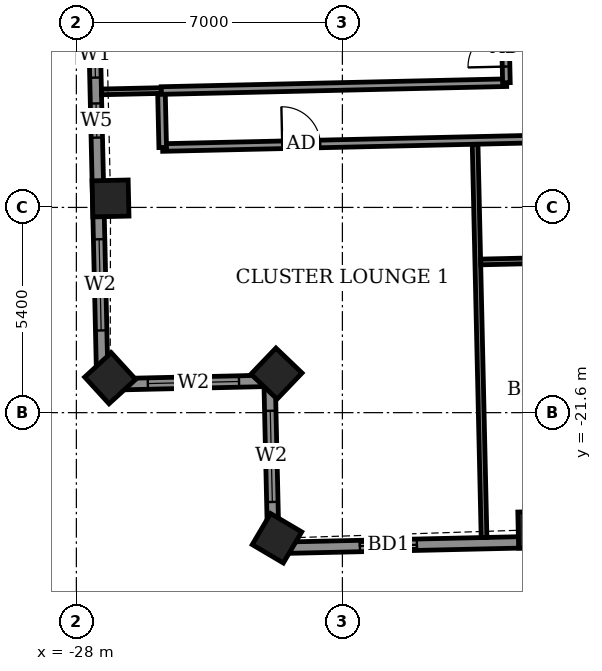
"""IFC4 building model, lengths in metres.
Left out: names, types, materials, properties, quantities, classifications, styles, units other than length and angle.
Written with IfcOpenShell. Run it as: python <this file> out.ifc"""

import sys

from ifc_helpers import new_model, si_unit, direction, frame, frame_2d, origin, origin_2d, place, context, subcontext, project, spatial, rectangle, extrude, element, fill, save


model = new_model("IFC4")
c1 = context("Model", 3, precision=1e-05, world=origin(), true_north=direction((0.0, 1.0)))
c2 = subcontext(c1, "Body", "Model", "MODEL_VIEW")
j1 = project(units=[si_unit("LENGTHUNIT", "METRE"), si_unit("PLANEANGLEUNIT", "RADIAN")], contexts=[c1])
p1 = place(None, origin())
s1 = spatial("IfcSite", under=j1, at=p1, CompositionType="ELEMENT")
p2 = place(p1, origin())
s2 = spatial("IfcBuilding", under=s1, at=p2, CompositionType="ELEMENT")
p3 = place(p2, frame((0.0, 0.0, 279.9)))
s3 = spatial("IfcBuildingStorey", under=s2, at=p3, CompositionType="ELEMENT", Elevation=279.9)
for number, where, z_axis, x_axis in (
    (1, (-27.101, -15.964, -0.55), (0.0, 0.0, 1.0), (0.023, -1.0, 0.0)),
    (2, (-27.11, -20.695, -0.55), (0.0, 0.0, 1.0), (0.675, -0.738, 0.0)),
    (3, (-22.734, -20.572, -0.55), (0.0, 0.0, 1.0), (0.723, -0.691, 0.0)),
    (4, (-22.721, -24.905, -0.55), (0.0, 0.0, 1.0), (0.861, -0.509, 0.0)),
    (5, (-15.899, -24.679, -0.55), (0.0, 0.0, 1.0), (1.0, 0.023, 0.0)),
):
    element("IfcColumn", number, at=place(p3, frame(where, z_axis=z_axis, x_axis=x_axis)), inside=s3, PredefinedType="COLUMN", context=c2, shape_type="SweptSolid", body=[
        extrude(rectangle(XDim=0.95, YDim=0.95, at=origin_2d()), origin(), (0.0, 0.0, 1.0), 3.6),
    ])
p4 = place(p3, frame((-27.665, -5.416, 0.0), z_axis=(0.0, 0.0, 1.0), x_axis=(0.022660024814, -0.999743228672, 0.0)))
e6 = element("IfcWall", 6, at=p4, inside=s3, PredefinedType="SOLIDWALL", context=c2, shape_type="SweptSolid", body=[
    extrude(rectangle(XDim=15.45, YDim=0.3, at=frame_2d((7.725, 0.0))), origin(), (0.0, 0.0, 1.0), 2.55),
])
p5 = place(p4, frame((1.35, 0.0, 0.0)))
e7 = element("IfcOpeningElement", 7, at=p5, cuts=e6, PredefinedType="OPENING", context=c2, shape_type="SweptSolid", body=[
    extrude(rectangle(XDim=1.5, YDim=2.4, at=frame_2d((0.75, 1.2))), frame((0.0, 0.16, 0.0), z_axis=(0.0, -1.0, 0.0), x_axis=(1.0, 0.0, 0.0)), (0.0, 0.0, 1.0), 0.32),
])
p6 = place(p4, frame((6.171, 0.0, 0.9)))
e8 = element("IfcOpeningElement", 8, at=p6, cuts=e6, PredefinedType="OPENING", context=c2, shape_type="SweptSolid", body=[
    extrude(rectangle(XDim=1.2, YDim=1.5, at=frame_2d((0.6, 0.75))), frame((0.0, 0.16, 0.0), z_axis=(0.0, -1.0, 0.0), x_axis=(1.0, 0.0, 0.0)), (0.0, 0.0, 1.0), 0.32),
])
p7 = place(p4, frame((8.05, 0.0, 0.9)))
e9 = element("IfcOpeningElement", 9, at=p7, cuts=e6, PredefinedType="OPENING", context=c2, shape_type="SweptSolid", body=[
    extrude(rectangle(XDim=0.9, YDim=1.5, at=frame_2d((0.45, 0.75))), frame((0.0, 0.16, 0.0), z_axis=(0.0, -1.0, 0.0), x_axis=(1.0, 0.0, 0.0)), (0.0, 0.0, 1.0), 0.32),
])
p8 = place(p4, frame((11.625, 0.0, 0.9)))
e10 = element("IfcOpeningElement", 10, at=p8, cuts=e6, PredefinedType="OPENING", context=c2, shape_type="SweptSolid", body=[
    extrude(rectangle(XDim=2.4, YDim=1.5, at=frame_2d((1.2, 0.75))), frame((0.0, 0.16, 0.0), z_axis=(0.0, -1.0, 0.0), x_axis=(1.0, 0.0, 0.0)), (0.0, 0.0, 1.0), 0.32),
])
p9 = place(p3, frame((-27.315, -20.862, 0.0), z_axis=(0.0, 0.0, 1.0), x_axis=(0.999741204967, 0.022749133868, 0.0)))
e11 = element("IfcWall", 11, at=p9, inside=s3, PredefinedType="SOLIDWALL", context=c2, shape_type="SweptSolid", body=[
    extrude(rectangle(XDim=4.4, YDim=0.3, at=frame_2d((2.2, 0.0))), origin(), (0.0, 0.0, 1.0), 2.55),
])
p10 = place(p9, frame((1.196, 0.0, 0.9)))
e12 = element("IfcOpeningElement", 12, at=p10, cuts=e11, PredefinedType="OPENING", context=c2, shape_type="SweptSolid", body=[
    extrude(rectangle(XDim=2.4, YDim=1.5, at=frame_2d((1.2, 0.75))), frame((0.0, 0.16, 0.0), z_axis=(0.0, -1.0, 0.0), x_axis=(1.0, 0.0, 0.0)), (0.0, 0.0, 1.0), 0.32),
])
p11 = place(p3, frame((-22.916, -20.762, 0.0), z_axis=(0.0, 0.0, 1.0), x_axis=(0.022749133868, -0.999741204967, 0.0)))
e13 = element("IfcWall", 13, at=p11, inside=s3, PredefinedType="SOLIDWALL", context=c2, shape_type="SweptSolid", body=[
    extrude(rectangle(XDim=4.4, YDim=0.3, at=frame_2d((2.2, 0.0))), origin(), (0.0, 0.0, 1.0), 2.55),
])
p12 = place(p11, frame((0.789, 0.0, 0.9)))
e14 = element("IfcOpeningElement", 14, at=p12, cuts=e13, PredefinedType="OPENING", context=c2, shape_type="SweptSolid", body=[
    extrude(rectangle(XDim=2.4, YDim=1.5, at=frame_2d((1.2, 0.75))), frame((0.0, 0.16, 0.0), z_axis=(0.0, -1.0, 0.0), x_axis=(1.0, 0.0, 0.0)), (0.0, 0.0, 1.0), 0.32),
])
p13 = place(p3, frame((-22.816, -25.161, 0.0), z_axis=(0.0, 0.0, 1.0), x_axis=(0.999742646411, 0.022685699159, 0.0)))
e15 = element("IfcWall", 15, at=p13, inside=s3, PredefinedType="SOLIDWALL", context=c2, shape_type="SweptSolid", body=[
    extrude(rectangle(XDim=49.236, YDim=0.3, at=frame_2d((24.618, 0.0))), origin(), (0.0, 0.0, 1.0), 2.5),
])
p14 = place(p13, frame((2.277, 0.0, 0.0)))
e16 = element("IfcOpeningElement", 16, at=p14, cuts=e15, PredefinedType="OPENING", context=c2, shape_type="SweptSolid", body=[
    extrude(rectangle(XDim=1.5, YDim=2.4, at=frame_2d((0.75, 1.2))), frame((0.0, 0.16, 0.0), z_axis=(0.0, -1.0, 0.0), x_axis=(1.0, 0.0, 0.0)), (0.0, 0.0, 1.0), 0.32),
])
p15 = place(p13, frame((7.726, 0.0, 0.0)))
e17 = element("IfcOpeningElement", 17, at=p15, cuts=e15, PredefinedType="OPENING", context=c2, shape_type="SweptSolid", body=[
    extrude(rectangle(XDim=1.5, YDim=2.4, at=frame_2d((0.75, 1.2))), frame((0.0, 0.16, 0.0), z_axis=(0.0, -1.0, 0.0), x_axis=(1.0, 0.0, 0.0)), (0.0, 0.0, 1.0), 0.32),
])
p16 = place(p13, frame((11.039, 0.0, 0.0)))
e18 = element("IfcOpeningElement", 18, at=p16, cuts=e15, PredefinedType="OPENING", context=c2, shape_type="SweptSolid", body=[
    extrude(rectangle(XDim=1.5, YDim=2.4, at=frame_2d((0.75, 1.2))), frame((0.0, 0.16, 0.0), z_axis=(0.0, -1.0, 0.0), x_axis=(1.0, 0.0, 0.0)), (0.0, 0.0, 1.0), 0.32),
])
p17 = place(p13, frame((15.589, 0.0, 0.0)))
e19 = element("IfcOpeningElement", 19, at=p17, cuts=e15, PredefinedType="OPENING", context=c2, shape_type="SweptSolid", body=[
    extrude(rectangle(XDim=1.5, YDim=2.4, at=frame_2d((0.75, 1.2))), frame((0.0, 0.16, 0.0), z_axis=(0.0, -1.0, 0.0), x_axis=(1.0, 0.0, 0.0)), (0.0, 0.0, 1.0), 0.32),
])
p18 = place(p13, frame((18.903, 0.0, 0.0)))
e20 = element("IfcOpeningElement", 20, at=p18, cuts=e15, PredefinedType="OPENING", context=c2, shape_type="SweptSolid", body=[
    extrude(rectangle(XDim=1.5, YDim=2.4, at=frame_2d((0.75, 1.2))), frame((0.0, 0.16, 0.0), z_axis=(0.0, -1.0, 0.0), x_axis=(1.0, 0.0, 0.0)), (0.0, 0.0, 1.0), 0.32),
])
p19 = place(p13, frame((24.3, 0.0, 0.0)))
e21 = element("IfcOpeningElement", 21, at=p19, cuts=e15, PredefinedType="OPENING", context=c2, shape_type="SweptSolid", body=[
    extrude(rectangle(XDim=1.5, YDim=2.4, at=frame_2d((0.75, 1.2))), frame((0.0, 0.16, 0.0), z_axis=(0.0, -1.0, 0.0), x_axis=(1.0, 0.0, 0.0)), (0.0, 0.0, 1.0), 0.32),
])
p20 = place(p13, frame((29.265, 0.0, 0.0)))
e22 = element("IfcOpeningElement", 22, at=p20, cuts=e15, PredefinedType="OPENING", context=c2, shape_type="SweptSolid", body=[
    extrude(rectangle(XDim=1.5, YDim=2.4, at=frame_2d((0.75, 1.2))), frame((0.0, 0.16, 0.0), z_axis=(0.0, -1.0, 0.0), x_axis=(1.0, 0.0, 0.0)), (0.0, 0.0, 1.0), 0.32),
])
p21 = place(p13, frame((32.579, 0.0, 0.0)))
e23 = element("IfcOpeningElement", 23, at=p21, cuts=e15, PredefinedType="OPENING", context=c2, shape_type="SweptSolid", body=[
    extrude(rectangle(XDim=1.5, YDim=2.4, at=frame_2d((0.75, 1.2))), frame((0.0, 0.16, 0.0), z_axis=(0.0, -1.0, 0.0), x_axis=(1.0, 0.0, 0.0)), (0.0, 0.0, 1.0), 0.32),
])
p22 = place(p13, frame((37.4, 0.0, 0.0)))
e24 = element("IfcOpeningElement", 24, at=p22, cuts=e15, PredefinedType="OPENING", context=c2, shape_type="SweptSolid", body=[
    extrude(rectangle(XDim=1.5, YDim=2.4, at=frame_2d((0.75, 1.2))), frame((0.0, 0.16, 0.0), z_axis=(0.0, -1.0, 0.0), x_axis=(1.0, 0.0, 0.0)), (0.0, 0.0, 1.0), 0.32),
])
p23 = place(p13, frame((42.967, 0.0, 0.0)))
e25 = element("IfcOpeningElement", 25, at=p23, cuts=e15, PredefinedType="OPENING", context=c2, shape_type="SweptSolid", body=[
    extrude(rectangle(XDim=1.2, YDim=2.4, at=frame_2d((0.6, 1.2))), frame((0.0, 0.16, 0.0), z_axis=(0.0, -1.0, 0.0), x_axis=(1.0, 0.0, 0.0)), (0.0, 0.0, 1.0), 0.32),
])
p24 = place(p13, frame((45.421, 0.0, 0.9)))
e26 = element("IfcOpeningElement", 26, at=p24, cuts=e15, PredefinedType="OPENING", context=c2, shape_type="SweptSolid", body=[
    extrude(rectangle(XDim=2.4, YDim=1.5, at=frame_2d((1.2, 0.75))), frame((0.0, 0.16, 0.0), z_axis=(0.0, -1.0, 0.0), x_axis=(1.0, 0.0, 0.0)), (0.0, 0.0, 1.0), 0.32),
])
p25 = place(p3, frame((-17.273, -24.885, 0.0), z_axis=(0.0, 0.0, 1.0), x_axis=(-0.022716582742, 0.999741945138, 0.0)))
e27 = element("IfcWall", 27, at=p25, inside=s3, PredefinedType="PARTITIONING", context=c2, shape_type="SweptSolid", body=[
    extrude(rectangle(XDim=10.35, YDim=0.15, at=frame_2d((5.175, 0.0))), origin(), (0.0, 0.0, 1.0), 2.55),
])
p26 = place(p3, frame((-17.36, -17.635, 0.0), z_axis=(0.0, 0.0, 1.0), x_axis=(0.99974031529, 0.022788198363, 0.0)))
e28 = element("IfcWall", 28, at=p26, inside=s3, PredefinedType="PARTITIONING", context=c2, shape_type="SweptSolid", body=[
    extrude(rectangle(XDim=2.325, YDim=0.15, at=frame_2d((1.162, 0.0))), origin(), (0.0, 0.0, 1.0), 3.05),
])
p27 = place(p3, frame((-25.731, -14.624, 0.0), z_axis=(0.0, 0.0, 1.0), x_axis=(0.999742799525, 0.022678950563, 0.0)))
e29 = element("IfcWall", 29, at=p27, inside=s3, PredefinedType="PARTITIONING", context=c2, shape_type="SweptSolid", body=[
    extrude(rectangle(XDim=55.386, YDim=0.2, at=frame_2d((27.693, 0.0))), origin(), (0.0, 0.0, 1.0), 3.05),
])
p28 = place(p27, frame((3.149, 0.0, 0.0)))
e30 = element("IfcOpeningElement", 30, at=p28, cuts=e29, PredefinedType="OPENING", context=c2, shape_type="SweptSolid", body=[
    extrude(rectangle(XDim=1.0, YDim=2.1, at=frame_2d((0.5, 1.05))), frame((0.0, 0.11, 0.0), z_axis=(0.0, -1.0, 0.0), x_axis=(1.0, 0.0, 0.0)), (0.0, 0.0, 1.0), 0.22),
])
p29 = place(p27, frame((11.1, 0.0, 0.0)))
e31 = element("IfcOpeningElement", 31, at=p29, cuts=e29, PredefinedType="OPENING", context=c2, shape_type="SweptSolid", body=[
    extrude(rectangle(XDim=0.9, YDim=2.1, at=frame_2d((0.45, 1.05))), frame((0.0, 0.11, 0.0), z_axis=(0.0, -1.0, 0.0), x_axis=(1.0, 0.0, 0.0)), (0.0, 0.0, 1.0), 0.22),
])
p30 = place(p27, frame((12.95, 0.0, 0.0)))
e32 = element("IfcOpeningElement", 32, at=p30, cuts=e29, PredefinedType="OPENING", context=c2, shape_type="SweptSolid", body=[
    extrude(rectangle(XDim=0.9, YDim=2.1, at=frame_2d((0.45, 1.05))), frame((0.0, 0.11, 0.0), z_axis=(0.0, -1.0, 0.0), x_axis=(1.0, 0.0, 0.0)), (0.0, 0.0, 1.0), 0.22),
])
p31 = place(p27, frame((19.675, 0.0, 0.0)))
e33 = element("IfcOpeningElement", 33, at=p31, cuts=e29, PredefinedType="OPENING", context=c2, shape_type="SweptSolid", body=[
    extrude(rectangle(XDim=0.9, YDim=2.1, at=frame_2d((0.45, 1.05))), frame((0.0, 0.11, 0.0), z_axis=(0.0, -1.0, 0.0), x_axis=(1.0, 0.0, 0.0)), (0.0, 0.0, 1.0), 0.22),
])
p32 = place(p27, frame((21.7, 0.0, 0.0)))
e34 = element("IfcOpeningElement", 34, at=p32, cuts=e29, PredefinedType="OPENING", context=c2, shape_type="SweptSolid", body=[
    extrude(rectangle(XDim=0.9, YDim=2.1, at=frame_2d((0.45, 1.05))), frame((0.0, 0.11, 0.0), z_axis=(0.0, -1.0, 0.0), x_axis=(1.0, 0.0, 0.0)), (0.0, 0.0, 1.0), 0.22),
])
p33 = place(p27, frame((28.475, 0.0, 0.0)))
e35 = element("IfcOpeningElement", 35, at=p33, cuts=e29, PredefinedType="OPENING", context=c2, shape_type="SweptSolid", body=[
    extrude(rectangle(XDim=0.9, YDim=2.1, at=frame_2d((0.45, 1.05))), frame((0.0, 0.11, 0.0), z_axis=(0.0, -1.0, 0.0), x_axis=(1.0, 0.0, 0.0)), (0.0, 0.0, 1.0), 0.22),
])
p34 = place(p27, frame((30.45, 0.0, 0.0)))
e36 = element("IfcOpeningElement", 36, at=p34, cuts=e29, PredefinedType="OPENING", context=c2, shape_type="SweptSolid", body=[
    extrude(rectangle(XDim=0.9, YDim=2.1, at=frame_2d((0.45, 1.05))), frame((0.0, 0.11, 0.0), z_axis=(0.0, -1.0, 0.0), x_axis=(1.0, 0.0, 0.0)), (0.0, 0.0, 1.0), 0.22),
])
p35 = place(p27, frame((37.25, 0.0, 0.0)))
e37 = element("IfcOpeningElement", 37, at=p35, cuts=e29, PredefinedType="OPENING", context=c2, shape_type="SweptSolid", body=[
    extrude(rectangle(XDim=0.9, YDim=2.1, at=frame_2d((0.45, 1.05))), frame((0.0, 0.11, 0.0), z_axis=(0.0, -1.0, 0.0), x_axis=(1.0, 0.0, 0.0)), (0.0, 0.0, 1.0), 0.22),
])
p36 = place(p27, frame((39.175, 0.0, 0.0)))
e38 = element("IfcOpeningElement", 38, at=p36, cuts=e29, PredefinedType="OPENING", context=c2, shape_type="SweptSolid", body=[
    extrude(rectangle(XDim=0.9, YDim=2.1, at=frame_2d((0.45, 1.05))), frame((0.0, 0.11, 0.0), z_axis=(0.0, -1.0, 0.0), x_axis=(1.0, 0.0, 0.0)), (0.0, 0.0, 1.0), 0.22),
])
p37 = place(p27, frame((45.875, 0.0, 0.0)))
e39 = element("IfcOpeningElement", 39, at=p37, cuts=e29, PredefinedType="OPENING", context=c2, shape_type="SweptSolid", body=[
    extrude(rectangle(XDim=0.9, YDim=2.1, at=frame_2d((0.45, 1.05))), frame((0.0, 0.11, 0.0), z_axis=(0.0, -1.0, 0.0), x_axis=(1.0, 0.0, 0.0)), (0.0, 0.0, 1.0), 0.22),
])
p38 = place(p27, frame((51.127, 0.0, 0.0)))
e40 = element("IfcOpeningElement", 40, at=p38, cuts=e29, PredefinedType="OPENING", context=c2, shape_type="SweptSolid", body=[
    extrude(rectangle(XDim=1.0, YDim=2.1, at=frame_2d((0.5, 1.05))), frame((0.0, 0.11, 0.0), z_axis=(0.0, -1.0, 0.0), x_axis=(1.0, 0.0, 0.0)), (0.0, 0.0, 1.0), 0.22),
])
p39 = place(p3, frame((-25.728, -14.624, 0.0), z_axis=(0.0, 0.0, 1.0), x_axis=(-0.022632637625, 0.99974384905, 0.0)))
e41 = element("IfcWall", 41, at=p39, inside=s3, PredefinedType="PARTITIONING", context=c2, shape_type="SweptSolid", body=[
    extrude(rectangle(XDim=1.5, YDim=0.2, at=frame_2d((0.75, 0.0))), origin(), (0.0, 0.0, 1.0), 3.05),
])
p40 = place(p3, frame((-27.339, -13.16, 0.0), z_axis=(0.0, 0.0, 1.0), x_axis=(0.999754171712, 0.022171967518, 0.0)))
e42 = element("IfcWall", 42, at=p40, inside=s3, PredefinedType="PARTITIONING", context=c2, shape_type="SweptSolid", body=[
    extrude(rectangle(XDim=1.575, YDim=0.15, at=frame_2d((0.787, 0.0))), origin(), (0.0, 0.0, 1.0), 2.55),
])
p41 = place(p3, frame((-25.765, -13.125, 0.0), z_axis=(0.0, 0.0, 1.0), x_axis=(0.999740502457, 0.022779985654, 0.0)))
e43 = element("IfcWall", 43, at=p41, inside=s3, PredefinedType="PARTITIONING", context=c2, shape_type="SweptSolid", body=[
    extrude(rectangle(XDim=9.088, YDim=0.2, at=frame_2d((4.544, 0.0))), origin(), (0.0, 0.0, 1.0), 3.05),
])
p42 = place(p3, frame((-16.684, -12.919, 0.0), z_axis=(0.0, 0.0, 1.0), x_axis=(-0.022712214871, 0.999742044377, 0.0)))
e44 = element("IfcWall", 44, at=p42, inside=s3, PredefinedType="PARTITIONING", context=c2, shape_type="SweptSolid", body=[
    extrude(rectangle(XDim=26.551, YDim=0.2, at=frame_2d((13.275, 0.0))), origin(), (0.0, 0.0, 1.0), 3.05),
])
p43 = place(p42, frame((24.688, 0.0, 0.0)))
e45 = element("IfcOpeningElement", 45, at=p43, cuts=e44, PredefinedType="OPENING", context=c2, shape_type="SweptSolid", body=[
    extrude(rectangle(XDim=1.0, YDim=2.1, at=frame_2d((0.5, 1.05))), frame((0.0, 0.11, 0.0), z_axis=(0.0, -1.0, 0.0), x_axis=(1.0, 0.0, 0.0)), (0.0, 0.0, 1.0), 0.22),
])
p44 = place(p42, frame((21.975, 0.0, 0.0)))
e46 = element("IfcOpeningElement", 46, at=p44, cuts=e44, PredefinedType="OPENING", context=c2, shape_type="SweptSolid", body=[
    extrude(rectangle(XDim=0.9, YDim=2.1, at=frame_2d((0.45, 1.05))), frame((0.0, 0.11, 0.0), z_axis=(0.0, -1.0, 0.0), x_axis=(1.0, 0.0, 0.0)), (0.0, 0.0, 1.0), 0.22),
])
p45 = place(p42, frame((16.875, 0.0, 0.0)))
e47 = element("IfcOpeningElement", 47, at=p45, cuts=e44, PredefinedType="OPENING", context=c2, shape_type="SweptSolid", body=[
    extrude(rectangle(XDim=1.0, YDim=2.1, at=frame_2d((0.5, 1.05))), frame((0.0, 0.11, 0.0), z_axis=(0.0, -1.0, 0.0), x_axis=(1.0, 0.0, 0.0)), (0.0, 0.0, 1.0), 0.22),
])
p46 = place(p42, frame((19.375, 0.0, 0.0)))
e48 = element("IfcOpeningElement", 48, at=p46, cuts=e44, PredefinedType="OPENING", context=c2, shape_type="SweptSolid", body=[
    extrude(rectangle(XDim=0.9, YDim=2.1, at=frame_2d((0.45, 1.05))), frame((0.0, 0.11, 0.0), z_axis=(0.0, -1.0, 0.0), x_axis=(1.0, 0.0, 0.0)), (0.0, 0.0, 1.0), 0.22),
])
p47 = place(p42, frame((14.05, 0.0, 0.0)))
e49 = element("IfcOpeningElement", 49, at=p47, cuts=e44, PredefinedType="OPENING", context=c2, shape_type="SweptSolid", body=[
    extrude(rectangle(XDim=1.0, YDim=2.1, at=frame_2d((0.5, 1.05))), frame((0.0, 0.11, 0.0), z_axis=(0.0, -1.0, 0.0), x_axis=(1.0, 0.0, 0.0)), (0.0, 0.0, 1.0), 0.22),
])
p48 = place(p42, frame((11.225, 0.0, 0.0)))
e50 = element("IfcOpeningElement", 50, at=p48, cuts=e44, PredefinedType="OPENING", context=c2, shape_type="SweptSolid", body=[
    extrude(rectangle(XDim=0.9, YDim=2.1, at=frame_2d((0.45, 1.05))), frame((0.0, 0.11, 0.0), z_axis=(0.0, -1.0, 0.0), x_axis=(1.0, 0.0, 0.0)), (0.0, 0.0, 1.0), 0.22),
])
p49 = place(p42, frame((8.37, 0.0, 0.0)))
e51 = element("IfcOpeningElement", 51, at=p49, cuts=e44, PredefinedType="OPENING", context=c2, shape_type="SweptSolid", body=[
    extrude(rectangle(XDim=1.0, YDim=2.1, at=frame_2d((0.5, 1.05))), frame((0.0, 0.11, 0.0), z_axis=(0.0, -1.0, 0.0), x_axis=(1.0, 0.0, 0.0)), (0.0, 0.0, 1.0), 0.22),
])
p50 = place(p42, frame((5.263, 0.0, 0.0)))
e52 = element("IfcOpeningElement", 52, at=p50, cuts=e44, PredefinedType="OPENING", context=c2, shape_type="SweptSolid", body=[
    extrude(rectangle(XDim=1.0, YDim=2.1, at=frame_2d((0.5, 1.05))), frame((0.0, 0.11, 0.0), z_axis=(0.0, -1.0, 0.0), x_axis=(1.0, 0.0, 0.0)), (0.0, 0.0, 1.0), 0.22),
])
p51 = place(p42, frame((0.425, 0.0, 0.0)))
e53 = element("IfcOpeningElement", 53, at=p51, cuts=e44, PredefinedType="OPENING", context=c2, shape_type="SweptSolid", body=[
    extrude(rectangle(XDim=1.0, YDim=2.1, at=frame_2d((0.5, 1.05))), frame((0.0, 0.11, 0.0), z_axis=(0.0, -1.0, 0.0), x_axis=(1.0, 0.0, 0.0)), (0.0, 0.0, 1.0), 0.22),
])
p52 = place(p42, frame((2.6, 0.0, 0.0)))
e54 = element("IfcOpeningElement", 54, at=p52, cuts=e44, PredefinedType="OPENING", context=c2, shape_type="SweptSolid", body=[
    extrude(rectangle(XDim=0.9, YDim=2.1, at=frame_2d((0.45, 1.05))), frame((0.0, 0.11, 0.0), z_axis=(0.0, -1.0, 0.0), x_axis=(1.0, 0.0, 0.0)), (0.0, 0.0, 1.0), 0.22),
])
p53 = place(p6, origin())
e55 = element("IfcWindow", 55, at=p53, inside=s3, PartitioningType="SINGLE_PANEL", PredefinedType="WINDOW", context=c2, shape_type="SweptSolid", body=[
    extrude(rectangle(XDim=1.2, YDim=1.5, at=frame_2d((0.6, 0.75))), frame((0.0, 0.03, 0.0), z_axis=(0.0, -1.0, 0.0), x_axis=(1.0, 0.0, 0.0)), (0.0, 0.0, 1.0), 0.06),
])
fill(e8, e55)
p54 = place(p7, origin())
e56 = element("IfcWindow", 56, at=p54, inside=s3, PartitioningType="SINGLE_PANEL", PredefinedType="WINDOW", context=c2, shape_type="SweptSolid", body=[
    extrude(rectangle(XDim=0.9, YDim=1.5, at=frame_2d((0.45, 0.75))), frame((0.0, 0.03, 0.0), z_axis=(0.0, -1.0, 0.0), x_axis=(1.0, 0.0, 0.0)), (0.0, 0.0, 1.0), 0.06),
])
fill(e9, e56)
p55 = place(p8, origin())
e57 = element("IfcWindow", 57, at=p55, inside=s3, PartitioningType="DOUBLE_PANEL_VERTICAL", PredefinedType="WINDOW", context=c2, shape_type="SweptSolid", body=[
    extrude(rectangle(XDim=2.4, YDim=1.5, at=frame_2d((1.2, 0.75))), frame((0.0, 0.03, 0.0), z_axis=(0.0, -1.0, 0.0), x_axis=(1.0, 0.0, 0.0)), (0.0, 0.0, 1.0), 0.06),
])
fill(e10, e57)
p56 = place(p10, origin())
e58 = element("IfcWindow", 58, at=p56, inside=s3, PartitioningType="DOUBLE_PANEL_VERTICAL", PredefinedType="WINDOW", context=c2, shape_type="SweptSolid", body=[
    extrude(rectangle(XDim=2.4, YDim=1.5, at=frame_2d((1.2, 0.75))), frame((0.0, 0.03, 0.0), z_axis=(0.0, -1.0, 0.0), x_axis=(1.0, 0.0, 0.0)), (0.0, 0.0, 1.0), 0.06),
])
fill(e12, e58)
p57 = place(p12, origin())
e59 = element("IfcWindow", 59, at=p57, inside=s3, PartitioningType="DOUBLE_PANEL_VERTICAL", PredefinedType="WINDOW", context=c2, shape_type="SweptSolid", body=[
    extrude(rectangle(XDim=2.4, YDim=1.5, at=frame_2d((1.2, 0.75))), frame((0.0, 0.03, 0.0), z_axis=(0.0, -1.0, 0.0), x_axis=(1.0, 0.0, 0.0)), (0.0, 0.0, 1.0), 0.06),
])
fill(e14, e59)
p58 = place(p14, origin())
e60 = element("IfcDoor", 60, at=p58, inside=s3, OperationType="SLIDING_TO_LEFT", PredefinedType="DOOR", context=c2, shape_type="SweptSolid", body=[
    extrude(rectangle(XDim=1.5, YDim=2.4, at=frame_2d((0.75, 1.2))), frame((0.0, 0.025, 0.0), z_axis=(0.0, -1.0, 0.0), x_axis=(1.0, 0.0, 0.0)), (0.0, 0.0, 1.0), 0.05),
])
fill(e16, e60)
p59 = place(p28, origin())
e61 = element("IfcDoor", 61, at=p59, inside=s3, OperationType="SINGLE_SWING_LEFT", PredefinedType="DOOR", context=c2, shape_type="SweptSolid", body=[
    extrude(rectangle(XDim=1.0, YDim=2.1, at=frame_2d((0.5, 1.05))), frame((0.0, 0.025, 0.0), z_axis=(0.0, -1.0, 0.0), x_axis=(1.0, 0.0, 0.0)), (0.0, 0.0, 1.0), 0.05),
])
fill(e30, e61)
p60 = place(p51, origin())
e62 = element("IfcDoor", 62, at=p60, inside=s3, OperationType="SINGLE_SWING_RIGHT", PredefinedType="DOOR", context=c2, shape_type="SweptSolid", body=[
    extrude(rectangle(XDim=1.0, YDim=2.1, at=frame_2d((0.5, 1.05))), frame((0.0, 0.025, 0.0), z_axis=(0.0, -1.0, 0.0), x_axis=(1.0, 0.0, 0.0)), (0.0, 0.0, 1.0), 0.05),
])
fill(e53, e62)
save(model, sys.argv[1])
